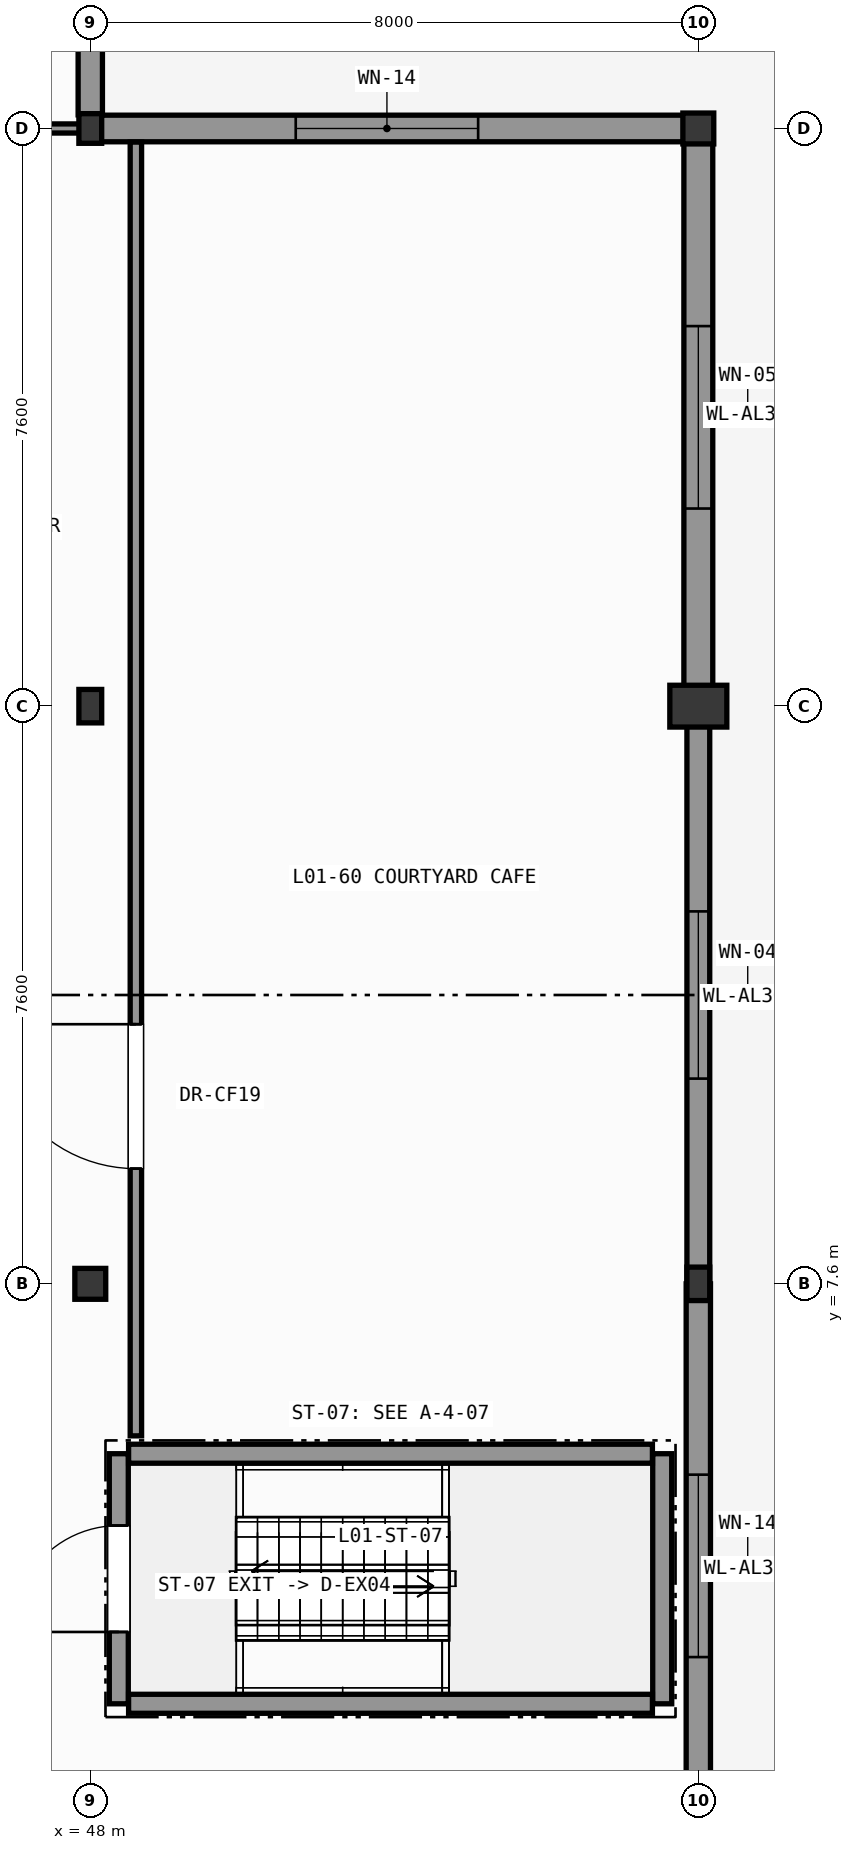
"""IFC4 building model, lengths in metres.
Left out: names, types, materials, properties, quantities, classifications, styles, units other than length and angle.
Written with IfcOpenShell. Run it as: python <this file> out.ifc"""

import sys

from ifc_helpers import new_model, si_unit, direction, frame, frame_2d, origin, origin_2d, place, context, subcontext, project, spatial, rectangle, hollow_circle, i_section, extrude, element, fill, save


model = new_model("IFC4")
c1 = context("Model", 3, precision=1e-05, world=origin(), true_north=direction((0.0, 1.0)))
c2 = subcontext(c1, "Body", "Model", "MODEL_VIEW")
j1 = project(units=[si_unit("LENGTHUNIT", "METRE"), si_unit("PLANEANGLEUNIT", "RADIAN")], contexts=[c1])
p1 = place(None, origin())
s1 = spatial("IfcSite", under=j1, at=p1, CompositionType="ELEMENT")
p2 = place(p1, origin())
s2 = spatial("IfcBuilding", under=s1, at=p2, CompositionType="ELEMENT")
p3 = place(p2, origin())
s3 = spatial("IfcBuildingStorey", under=s2, at=p3, CompositionType="ELEMENT", Elevation=0.0)
p4 = place(p3, frame((48.0, 7.6, 0.0), z_axis=(0.0, 0.0, 1.0), x_axis=(1.0, 0.0, 0.0)))
e1 = element("IfcColumn", 1, at=p4, inside=s3, PredefinedType="COLUMN", context=c2, shape_type="SweptSolid", body=[
    extrude(hollow_circle(Radius=0.203, WallThickness=0.02, at=origin_2d()), origin(), (0.0, 0.0, 1.0), 7.8),
])
p5 = place(p3, frame((48.0, 15.2, 0.0), z_axis=(0.0, 0.0, 1.0), x_axis=(1.0, 0.0, 0.0)))
e2 = element("IfcColumn", 2, at=p5, inside=s3, PredefinedType="COLUMN", context=c2, shape_type="SweptSolid", body=[
    extrude(i_section(OverallWidth=0.3, OverallDepth=0.44, WebThickness=0.011, FlangeThickness=0.021, FilletRadius=0.027, at=origin_2d()), origin(), (0.0, 0.0, 1.0), 7.8),
])
p6 = place(p3, frame((48.0, 22.8, 0.0), z_axis=(0.0, 0.0, 1.0), x_axis=(1.0, 0.0, 0.0)))
e3 = element("IfcColumn", 3, at=p6, inside=s3, PredefinedType="COLUMN", context=c2, shape_type="SweptSolid", body=[
    extrude(i_section(OverallWidth=0.3, OverallDepth=0.39, WebThickness=0.011, FlangeThickness=0.019, FilletRadius=0.027, at=origin_2d()), origin(), (0.0, 0.0, 1.0), 7.8),
])
p7 = place(p3, frame((56.0, 7.6, 0.0), z_axis=(0.0, 0.0, 1.0), x_axis=(1.0, 0.0, 0.0)))
e4 = element("IfcColumn", 4, at=p7, inside=s3, PredefinedType="COLUMN", context=c2, shape_type="SweptSolid", body=[
    extrude(i_section(OverallWidth=0.3, OverallDepth=0.44, WebThickness=0.011, FlangeThickness=0.021, FilletRadius=0.027, at=origin_2d()), origin(), (0.0, 0.0, 1.0), 7.8),
])
p8 = place(p3, frame((56.0, 15.2, 0.0), z_axis=(0.0, 0.0, 1.0), x_axis=(1.0, 0.0, 0.0)))
e5 = element("IfcColumn", 5, at=p8, inside=s3, PredefinedType="PILASTER", context=c2, shape_type="SweptSolid", body=[
    extrude(rectangle(XDim=0.75, YDim=0.55, at=origin_2d()), origin(), (0.0, 0.0, 1.0), 7.8),
])
p9 = place(p3, frame((56.0, 22.8, 0.0), z_axis=(0.0, 0.0, 1.0), x_axis=(1.0, 0.0, 0.0)))
e6 = element("IfcColumn", 6, at=p9, inside=s3, PredefinedType="COLUMN", context=c2, shape_type="SweptSolid", body=[
    extrude(hollow_circle(Radius=0.203, WallThickness=0.02, at=origin_2d()), origin(), (0.0, 0.0, 1.0), 7.8),
])
p10 = place(p3, frame((56.0, 7.6, 0.0), z_axis=(0.0, 0.0, 1.0), x_axis=(0.0, -1.0, 0.0)))
e7 = element("IfcWall", 7, at=p10, inside=s3, PredefinedType="SOLIDWALL", context=c2, shape_type="SweptSolid", body=[
    extrude(rectangle(XDim=7.421, YDim=0.32, at=frame_2d((3.71, 0.0))), origin(), (0.0, 0.0, 1.0), 7.025),
])
p11 = place(p10, frame((2.51, 0.0, 0.95)))
e8 = element("IfcOpeningElement", 8, at=p11, cuts=e7, PredefinedType="OPENING", context=c2, shape_type="SweptSolid", body=[
    extrude(rectangle(XDim=2.4, YDim=3.0, at=frame_2d((1.2, 1.5))), frame((0.0, 0.17, 0.0), z_axis=(0.0, -1.0, 0.0), x_axis=(1.0, 0.0, 0.0)), (0.0, 0.0, 1.0), 0.34),
])
p12 = place(p3, frame((56.0, 15.2, 0.0), z_axis=(0.0, 0.0, 1.0), x_axis=(0.0, -1.0, 0.0)))
e9 = element("IfcWall", 9, at=p12, inside=s3, PredefinedType="SOLIDWALL", context=c2, shape_type="SweptSolid", body=[
    extrude(rectangle(XDim=7.6, YDim=0.3, at=frame_2d((3.8, 0.0))), origin(), (0.0, 0.0, 1.0), 7.025),
])
p13 = place(p12, frame((2.7, 0.0, 0.95)))
e10 = element("IfcOpeningElement", 10, at=p13, cuts=e9, PredefinedType="OPENING", context=c2, shape_type="SweptSolid", body=[
    extrude(rectangle(XDim=2.2, YDim=4.2, at=frame_2d((1.1, 2.1))), frame((0.0, 0.16, 0.0), z_axis=(0.0, -1.0, 0.0), x_axis=(1.0, 0.0, 0.0)), (0.0, 0.0, 1.0), 0.32),
])
p14 = place(p3, frame((56.0, 22.8, 0.0), z_axis=(0.0, 0.0, 1.0), x_axis=(0.0, -1.0, 0.0)))
e11 = element("IfcWall", 11, at=p14, inside=s3, PredefinedType="SOLIDWALL", context=c2, shape_type="SweptSolid", body=[
    extrude(rectangle(XDim=7.6, YDim=0.38, at=frame_2d((3.8, 0.0))), origin(), (0.0, 0.0, 1.0), 7.025),
])
p15 = place(p14, frame((2.6, 0.0, 0.95)))
e12 = element("IfcOpeningElement", 12, at=p15, cuts=e11, PredefinedType="OPENING", context=c2, shape_type="SweptSolid", body=[
    extrude(rectangle(XDim=2.4, YDim=4.6, at=frame_2d((1.2, 2.3))), frame((0.0, 0.2, 0.0), z_axis=(0.0, -1.0, 0.0), x_axis=(1.0, 0.0, 0.0)), (0.0, 0.0, 1.0), 0.4),
])
p16 = place(p3, frame((48.0, 22.8, 0.0), z_axis=(0.0, 0.0, 1.0), x_axis=(1.0, 0.0, 0.0)))
e13 = element("IfcWall", 13, at=p16, inside=s3, PredefinedType="SOLIDWALL", context=c2, shape_type="SweptSolid", body=[
    extrude(rectangle(XDim=7.806, YDim=0.35, at=frame_2d((3.903, 0.0))), origin(), (0.0, 0.0, 1.0), 7.075),
])
p17 = place(p16, frame((2.703, 0.0, 0.95)))
e14 = element("IfcOpeningElement", 14, at=p17, cuts=e13, PredefinedType="OPENING", context=c2, shape_type="SweptSolid", body=[
    extrude(rectangle(XDim=2.4, YDim=3.0, at=frame_2d((1.2, 1.5))), frame((0.0, 0.185, 0.0), z_axis=(0.0, -1.0, 0.0), x_axis=(1.0, 0.0, 0.0)), (0.0, 0.0, 1.0), 0.37),
])
p18 = place(p3, frame((48.0, 30.4, 0.0), z_axis=(0.0, 0.0, 1.0), x_axis=(0.0, -1.0, 0.0)))
e15 = element("IfcWall", 15, at=p18, inside=s3, PredefinedType="SOLIDWALL", context=c2, shape_type="SweptSolid", body=[
    extrude(rectangle(XDim=7.421, YDim=0.32, at=frame_2d((3.71, 0.0))), origin(), (0.0, 0.0, 1.0), 7.025),
])
p19 = place(p18, frame((2.611, 0.0, 0.95)))
e16 = element("IfcOpeningElement", 16, at=p19, cuts=e15, PredefinedType="OPENING", context=c2, shape_type="SweptSolid", body=[
    extrude(rectangle(XDim=2.2, YDim=4.2, at=frame_2d((1.1, 2.1))), frame((0.0, 0.17, 0.0), z_axis=(0.0, -1.0, 0.0), x_axis=(1.0, 0.0, 0.0)), (0.0, 0.0, 1.0), 0.34),
])
p20 = place(p3, frame((48.375, 2.075, 0.0), z_axis=(0.0, 0.0, 1.0), x_axis=(0.0, 1.0, 0.0)))
e17 = element("IfcWall", 17, at=p20, inside=s3, PredefinedType="SHEAR", context=c2, shape_type="SweptSolid", body=[
    extrude(rectangle(XDim=3.29, YDim=0.25, at=frame_2d((1.645, 0.0))), origin(), (0.0, 0.0, 1.0), 7.54),
])
p21 = place(p20, frame((0.945, 0.0, 0.0)))
e18 = element("IfcOpeningElement", 18, at=p21, cuts=e17, PredefinedType="OPENING", context=c2, shape_type="SweptSolid", body=[
    extrude(rectangle(XDim=1.4, YDim=2.2, at=frame_2d((0.7, 1.1))), frame((0.0, 0.135, 0.0), z_axis=(0.0, -1.0, 0.0), x_axis=(1.0, 0.0, 0.0)), (0.0, 0.0, 1.0), 0.27),
])
p22 = place(p3, frame((55.525, 2.075, 0.0), z_axis=(0.0, 0.0, 1.0), x_axis=(0.0, 1.0, 0.0)))
e19 = element("IfcWall", 19, at=p22, inside=s3, PredefinedType="SHEAR", context=c2, shape_type="SweptSolid", body=[
    extrude(rectangle(XDim=3.29, YDim=0.25, at=frame_2d((1.645, 0.0))), origin(), (0.0, 0.0, 1.0), 7.54),
])
for number, where, z_axis, x_axis in (
    (20, (48.504, 2.075, 0.0), (0.0, 0.0, 1.0), (1.0, 0.0, 0.0)),
    (21, (48.504, 5.365, 0.0), (0.0, 0.0, 1.0), (1.0, 0.0, 0.0)),
):
    element("IfcWall", number, at=place(p3, frame(where, z_axis=z_axis, x_axis=x_axis)), inside=s3, PredefinedType="SHEAR", context=c2, shape_type="SweptSolid", body=[
        extrude(rectangle(XDim=6.892, YDim=0.25, at=frame_2d((3.446, 0.0))), origin(), (0.0, 0.0, 1.0), 7.54),
    ])
p23 = place(p3, frame((48.6, 5.6, 0.0), z_axis=(0.0, 0.0, 1.0), x_axis=(0.0, 1.0, 0.0)))
e22 = element("IfcWall", 22, at=p23, inside=s3, PredefinedType="PARTITIONING", context=c2, shape_type="SweptSolid", body=[
    extrude(rectangle(XDim=17.021, YDim=0.15, at=frame_2d((8.51, 0.0))), origin(), (0.0, 0.0, 1.0), 7.54),
])
p24 = place(p23, frame((3.516, 0.0, 0.0)))
e23 = element("IfcOpeningElement", 23, at=p24, cuts=e22, PredefinedType="OPENING", context=c2, shape_type="SweptSolid", body=[
    extrude(rectangle(XDim=1.9, YDim=2.5, at=frame_2d((0.95, 1.25))), frame((0.0, 0.085, 0.0), z_axis=(0.0, -1.0, 0.0), x_axis=(1.0, 0.0, 0.0)), (0.0, 0.0, 1.0), 0.17),
])
p25 = place(p3, frame((43.6, 22.8, 0.0), z_axis=(0.0, 0.0, 1.0), x_axis=(1.0, 0.0, 0.0)))
e24 = element("IfcWall", 24, at=p25, inside=s3, PredefinedType="PARTITIONING", context=c2, shape_type="SweptSolid", body=[
    extrude(rectangle(XDim=4.4, YDim=0.12, at=frame_2d((2.2, 0.0))), origin(), (0.0, 0.0, 1.0), 7.075),
])
p26 = place(p25, frame((1.7, 0.0, 0.0)))
e25 = element("IfcOpeningElement", 25, at=p26, cuts=e24, PredefinedType="OPENING", context=c2, shape_type="SweptSolid", body=[
    extrude(rectangle(XDim=1.0, YDim=2.15, at=frame_2d((0.5, 1.075))), frame((0.0, 0.07, 0.0), z_axis=(0.0, -1.0, 0.0), x_axis=(1.0, 0.0, 0.0)), (0.0, 0.0, 1.0), 0.14),
])
p27 = place(p11, origin())
e26 = element("IfcWindow", 26, at=p27, inside=s3, PartitioningType="SINGLE_PANEL", PredefinedType="WINDOW", context=c2, shape_type="SweptSolid", body=[
    extrude(rectangle(XDim=2.4, YDim=3.0, at=frame_2d((1.2, 1.5))), frame((0.0, 0.03, 0.0), z_axis=(0.0, -1.0, 0.0), x_axis=(1.0, 0.0, 0.0)), (0.0, 0.0, 1.0), 0.06),
])
fill(e8, e26)
p28 = place(p13, origin())
e27 = element("IfcWindow", 27, at=p28, inside=s3, PartitioningType="SINGLE_PANEL", PredefinedType="WINDOW", context=c2, shape_type="SweptSolid", body=[
    extrude(rectangle(XDim=2.2, YDim=4.2, at=frame_2d((1.1, 2.1))), frame((0.0, 0.03, 0.0), z_axis=(0.0, -1.0, 0.0), x_axis=(1.0, 0.0, 0.0)), (0.0, 0.0, 1.0), 0.06),
])
fill(e10, e27)
p29 = place(p15, origin())
e28 = element("IfcWindow", 28, at=p29, inside=s3, PartitioningType="SINGLE_PANEL", PredefinedType="WINDOW", context=c2, shape_type="SweptSolid", body=[
    extrude(rectangle(XDim=2.4, YDim=4.6, at=frame_2d((1.2, 2.3))), frame((0.0, 0.03, 0.0), z_axis=(0.0, -1.0, 0.0), x_axis=(1.0, 0.0, 0.0)), (0.0, 0.0, 1.0), 0.06),
])
fill(e12, e28)
p30 = place(p17, origin())
e29 = element("IfcWindow", 29, at=p30, inside=s3, PartitioningType="SINGLE_PANEL", PredefinedType="WINDOW", context=c2, shape_type="SweptSolid", body=[
    extrude(rectangle(XDim=2.4, YDim=3.0, at=frame_2d((1.2, 1.5))), frame((0.0, 0.03, 0.0), z_axis=(0.0, -1.0, 0.0), x_axis=(1.0, 0.0, 0.0)), (0.0, 0.0, 1.0), 0.06),
])
fill(e14, e29)
p31 = place(p21, origin())
e30 = element("IfcDoor", 30, at=p31, inside=s3, OperationType="SINGLE_SWING_LEFT", PredefinedType="DOOR", context=c2, shape_type="SweptSolid", body=[
    extrude(rectangle(XDim=1.4, YDim=2.2, at=frame_2d((0.7, 1.1))), frame((0.0, 0.025, 0.0), z_axis=(0.0, -1.0, 0.0), x_axis=(1.0, 0.0, 0.0)), (0.0, 0.0, 1.0), 0.05),
])
fill(e18, e30)
p32 = place(p24, origin())
e31 = element("IfcDoor", 31, at=p32, inside=s3, OperationType="SINGLE_SWING_RIGHT", PredefinedType="DOOR", context=c2, shape_type="SweptSolid", body=[
    extrude(rectangle(XDim=1.9, YDim=2.5, at=frame_2d((0.95, 1.25))), frame((0.0, 0.025, 0.0), z_axis=(0.0, -1.0, 0.0), x_axis=(1.0, 0.0, 0.0)), (0.0, 0.0, 1.0), 0.05),
])
fill(e23, e31)
save(model, sys.argv[1])
